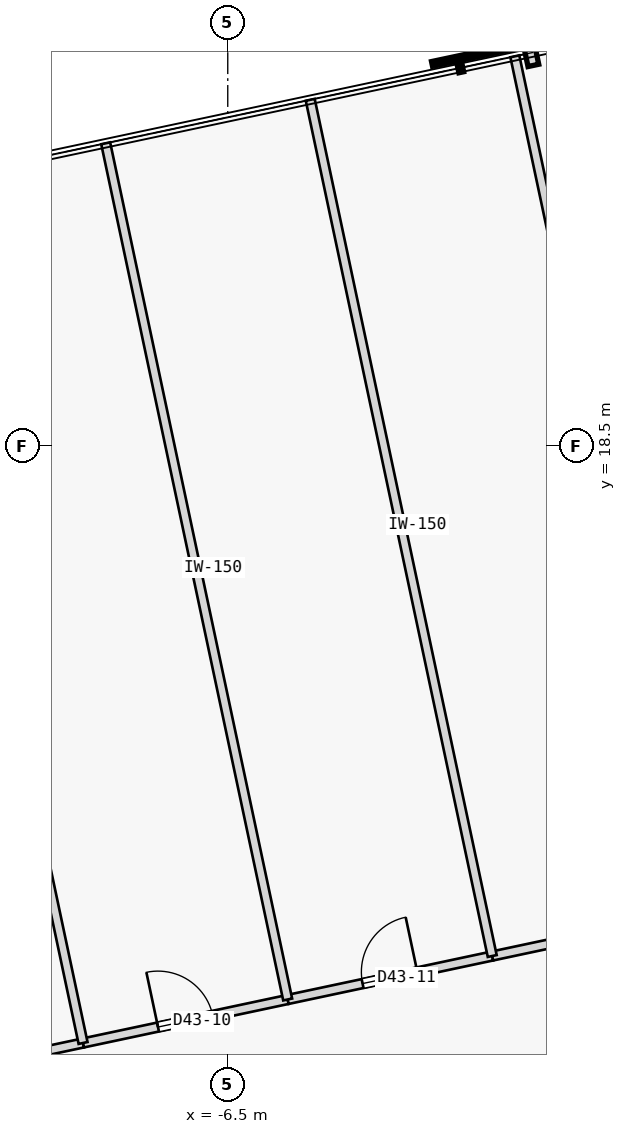
"""IFC4 building model, lengths in metres.
Left out: names, types, materials, properties, quantities, classifications, styles, units other than length and angle.
Written with IfcOpenShell. Run it as: python <this file> out.ifc"""

import sys

from ifc_helpers import new_model, si_unit, direction, frame, frame_2d, origin, place, context, subcontext, project, spatial, rectangle, extrude, element, fill, save


model = new_model("IFC4")
c1 = context("Model", 3, precision=1e-05, world=origin(), true_north=direction((0.0, 1.0)))
c2 = subcontext(c1, "Body", "Model", "MODEL_VIEW")
j1 = project(units=[si_unit("LENGTHUNIT", "METRE"), si_unit("PLANEANGLEUNIT", "RADIAN")], contexts=[c1])
p1 = place(None, origin())
s1 = spatial("IfcSite", under=j1, at=p1, CompositionType="ELEMENT")
p2 = place(p1, origin())
s2 = spatial("IfcBuilding", under=s1, at=p2, CompositionType="ELEMENT")
p3 = place(p2, frame((0.0, 0.0, 168.4)))
s3 = spatial("IfcBuildingStorey", under=s2, at=p3, CompositionType="ELEMENT", Elevation=168.4)
p4 = place(p3, frame((-12.243, 7.971, 0.0), z_axis=(0.0, 0.0, 1.0), x_axis=(0.978144956759, 0.207924129352, 0.0)))
e1 = element("IfcWall", 1, at=p4, inside=s3, PredefinedType="PARTITIONING", context=c2, shape_type="SweptSolid", body=[
    extrude(rectangle(XDim=3.439, YDim=0.15, at=frame_2d((1.72, 0.0))), origin(), (0.0, 0.0, 1.0), 3.175),
])
p5 = place(p4, frame((1.26, 0.0, 0.0)))
e2 = element("IfcOpeningElement", 2, at=p5, cuts=e1, PredefinedType="OPENING", context=c2, shape_type="SweptSolid", body=[
    extrude(rectangle(XDim=0.92, YDim=2.15, at=frame_2d((0.46, 1.075))), frame((0.0, 0.085, 0.0), z_axis=(0.0, -1.0, 0.0), x_axis=(1.0, 0.0, 0.0)), (0.0, 0.0, 1.0), 0.17),
])
p6 = place(p3, frame((-8.879, 8.687, 0.0), z_axis=(0.0, 0.0, 1.0), x_axis=(0.978154160849, 0.207880825506, 0.0)))
e3 = element("IfcWall", 3, at=p6, inside=s3, PredefinedType="PARTITIONING", context=c2, shape_type="SweptSolid", body=[
    extrude(rectangle(XDim=3.44, YDim=0.15, at=frame_2d((1.72, 0.0))), origin(), (0.0, 0.0, 1.0), 3.175),
])
p7 = place(p6, frame((1.26, 0.0, 0.0)))
e4 = element("IfcOpeningElement", 4, at=p7, cuts=e3, PredefinedType="OPENING", context=c2, shape_type="SweptSolid", body=[
    extrude(rectangle(XDim=0.92, YDim=2.15, at=frame_2d((0.46, 1.075))), frame((0.0, 0.085, 0.0), z_axis=(0.0, -1.0, 0.0), x_axis=(1.0, 0.0, 0.0)), (0.0, 0.0, 1.0), 0.17),
])
p8 = place(p3, frame((-5.515, 9.402, 0.0), z_axis=(0.0, 0.0, 1.0), x_axis=(0.978141887451, 0.207938567887, 0.0)))
e5 = element("IfcWall", 5, at=p8, inside=s3, PredefinedType="PARTITIONING", context=c2, shape_type="SweptSolid", body=[
    extrude(rectangle(XDim=3.439, YDim=0.15, at=frame_2d((1.719, 0.0))), origin(), (0.0, 0.0, 1.0), 3.175),
])
p9 = place(p8, frame((1.26, 0.0, 0.0)))
e6 = element("IfcOpeningElement", 6, at=p9, cuts=e5, PredefinedType="OPENING", context=c2, shape_type="SweptSolid", body=[
    extrude(rectangle(XDim=0.92, YDim=2.15, at=frame_2d((0.46, 1.075))), frame((0.0, 0.085, 0.0), z_axis=(0.0, -1.0, 0.0), x_axis=(1.0, 0.0, 0.0)), (0.0, 0.0, 1.0), 0.17),
])
p10 = place(p3, frame((-2.151, 10.117, 0.0), z_axis=(0.0, 0.0, 1.0), x_axis=(0.978157227602, 0.207866394808, 0.0)))
e7 = element("IfcWall", 7, at=p10, inside=s3, PredefinedType="PARTITIONING", context=c2, shape_type="SweptSolid", body=[
    extrude(rectangle(XDim=3.44, YDim=0.15, at=frame_2d((1.72, 0.0))), origin(), (0.0, 0.0, 1.0), 3.175),
])
p11 = place(p10, frame((1.26, 0.0, 0.0)))
e8 = element("IfcOpeningElement", 8, at=p11, cuts=e7, PredefinedType="OPENING", context=c2, shape_type="SweptSolid", body=[
    extrude(rectangle(XDim=0.92, YDim=2.15, at=frame_2d((0.46, 1.075))), frame((0.0, 0.085, 0.0), z_axis=(0.0, -1.0, 0.0), x_axis=(1.0, 0.0, 0.0)), (0.0, 0.0, 1.0), 0.17),
])
p12 = place(p3, frame((-8.879, 8.687, 0.0), z_axis=(0.0, 0.0, 1.0), x_axis=(-0.207915348705, 0.978146823219, 0.0)))
e9 = element("IfcWall", 9, at=p12, inside=s3, PredefinedType="PARTITIONING", context=c2, shape_type="SweptSolid", body=[
    extrude(rectangle(XDim=14.395, YDim=0.15, at=frame_2d((7.197, 0.0))), origin(), (0.0, 0.0, 1.0), 3.175),
])
p13 = place(p3, frame((-5.515, 9.402, 0.0), z_axis=(0.0, 0.0, 1.0), x_axis=(-0.207911899531, 0.97814755637, 0.0)))
e10 = element("IfcWall", 10, at=p13, inside=s3, PredefinedType="PARTITIONING", context=c2, shape_type="SweptSolid", body=[
    extrude(rectangle(XDim=14.395, YDim=0.15, at=frame_2d((7.198, 0.0))), origin(), (0.0, 0.0, 1.0), 3.175),
])
p14 = place(p3, frame((-2.151, 10.117, 0.0), z_axis=(0.0, 0.0, 1.0), x_axis=(-0.207915348705, 0.978146823219, 0.0)))
e11 = element("IfcWall", 11, at=p14, inside=s3, PredefinedType="PARTITIONING", context=c2, shape_type="SweptSolid", body=[
    extrude(rectangle(XDim=14.395, YDim=0.15, at=frame_2d((7.197, 0.0))), origin(), (0.0, 0.0, 1.0), 3.175),
])
p15 = place(p3, frame((1.214, 10.832, 0.0), z_axis=(0.0, 0.0, 1.0), x_axis=(-0.207911899531, 0.97814755637, 0.0)))
e12 = element("IfcWall", 12, at=p15, inside=s3, PredefinedType="PARTITIONING", context=c2, shape_type="SweptSolid", body=[
    extrude(rectangle(XDim=14.395, YDim=0.15, at=frame_2d((7.198, 0.0))), origin(), (0.0, 0.0, 1.0), 3.175),
])
p16 = place(p7, origin())
e13 = element("IfcDoor", 13, at=p16, inside=s3, OperationType="SINGLE_SWING_LEFT", PredefinedType="DOOR", context=c2, shape_type="SweptSolid", body=[
    extrude(rectangle(XDim=0.92, YDim=2.15, at=frame_2d((0.46, 1.075))), frame((0.0, 0.025, 0.0), z_axis=(0.0, -1.0, 0.0), x_axis=(1.0, 0.0, 0.0)), (0.0, 0.0, 1.0), 0.05),
])
fill(e4, e13)
p17 = place(p9, origin())
e14 = element("IfcDoor", 14, at=p17, inside=s3, OperationType="SINGLE_SWING_RIGHT", PredefinedType="DOOR", context=c2, shape_type="SweptSolid", body=[
    extrude(rectangle(XDim=0.92, YDim=2.15, at=frame_2d((0.46, 1.075))), frame((0.0, 0.025, 0.0), z_axis=(0.0, -1.0, 0.0), x_axis=(1.0, 0.0, 0.0)), (0.0, 0.0, 1.0), 0.05),
])
fill(e6, e14)
save(model, sys.argv[1])
